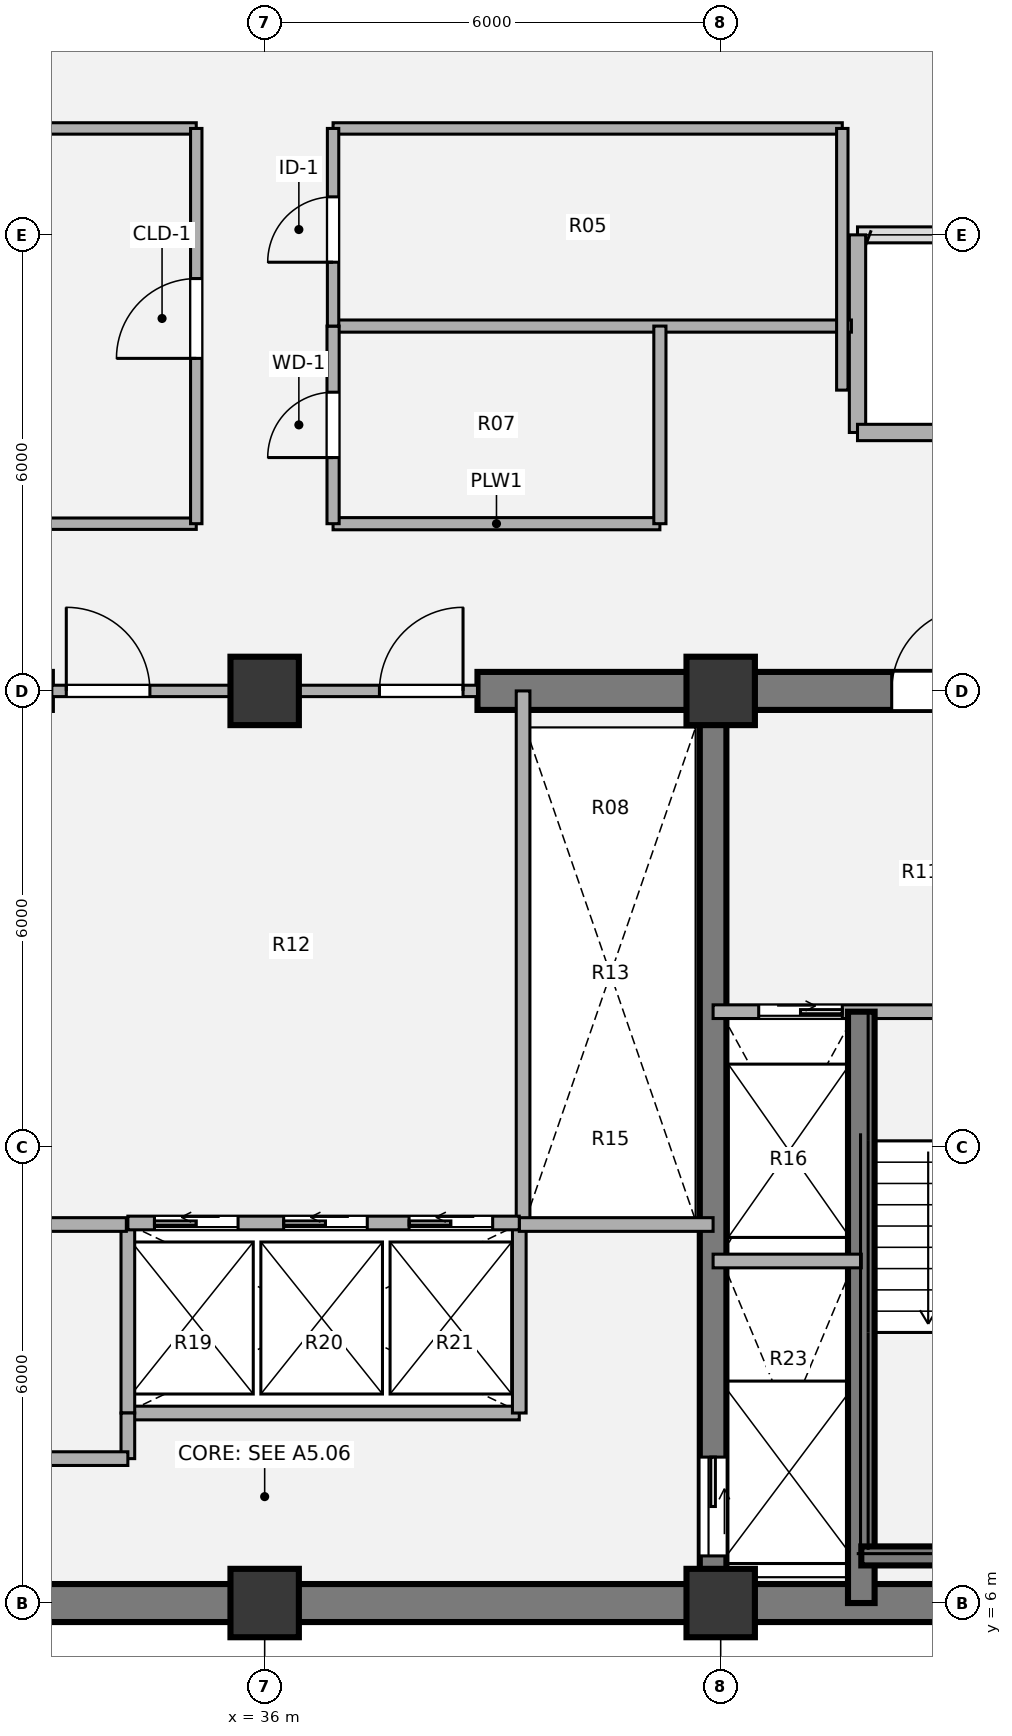
"""IFC4 building model, lengths in metres.
Left out: names, types, materials, properties, quantities, classifications, styles, units other than length and angle.
Written with IfcOpenShell. Run it as: python <this file> out.ifc"""

import sys

from ifc_helpers import new_model, si_unit, direction, frame, frame_2d, origin, origin_2d, place, context, subcontext, project, spatial, rectangle, extrude, source, transform, mapped, element, fill, save


model = new_model("IFC4")
c1 = context("Model", 3, precision=1e-05, world=origin(), true_north=direction((0.0, 1.0)))
c2 = subcontext(c1, "Body", "Model", "MODEL_VIEW")
j1 = project(units=[si_unit("LENGTHUNIT", "METRE"), si_unit("PLANEANGLEUNIT", "RADIAN")], contexts=[c1])
p1 = place(None, origin())
s1 = spatial("IfcSite", under=j1, at=p1, CompositionType="ELEMENT")
p2 = place(p1, origin())
s2 = spatial("IfcBuilding", under=s1, at=p2, CompositionType="ELEMENT")
p3 = place(p2, frame((0.0, 0.0, 123.84)))
s3 = spatial("IfcBuildingStorey", under=s2, at=p3, CompositionType="ELEMENT", Elevation=123.84)
m1 = source(origin(), c2, "Body", "SweptSolid", [
    extrude(rectangle(XDim=0.9, YDim=0.9, at=origin_2d()), origin(), (0.0, 0.0, 1.0), 3.78),
])
for number, where, z_axis, x_axis in (
    (1, (36.0, 6.0, 0.0), (0.0, 0.0, 1.0), (1.0, 0.0, 0.0)),
    (2, (42.0, 6.0, 0.0), (0.0, 0.0, 1.0), (1.0, 0.0, 0.0)),
    (3, (36.0, 18.0, 0.0), (0.0, 0.0, 1.0), (1.0, 0.0, 0.0)),
    (4, (42.0, 18.0, 0.0), (0.0, 0.0, 1.0), (1.0, 0.0, 0.0)),
):
    element("IfcColumn", number, at=place(p3, frame(where, z_axis=z_axis, x_axis=x_axis)), inside=s3, PredefinedType="COLUMN", context=c2, shape_type="MappedRepresentation", body=[
        mapped(m1, transform((0.0, 0.0, 0.0), x_axis=(1.0, 0.0, 0.0), y_axis=(0.0, 1.0, 0.0), z_axis=(0.0, 0.0, 1.0), scale=1.0)),
    ])
p4 = place(p3, frame((48.25, 6.0, 0.0), z_axis=(0.0, 0.0, 1.0), x_axis=(-1.0, 0.0, 0.0)))
e5 = element("IfcWall", 5, at=p4, inside=s3, PredefinedType="SHEAR", context=c2, shape_type="SweptSolid", body=[
    extrude(rectangle(XDim=24.5, YDim=0.5, at=frame_2d((12.25, 0.0))), origin(), (0.0, 0.0, 1.0), 3.78),
])
p5 = place(p3, frame((23.75, 18.0, 0.0), z_axis=(0.0, 0.0, 1.0), x_axis=(1.0, 0.0, 0.0)))
e6 = element("IfcWall", 6, at=p5, inside=s3, PredefinedType="SHEAR", context=c2, shape_type="SweptSolid", body=[
    extrude(rectangle(XDim=9.45, YDim=0.5, at=frame_2d((4.725, 0.0))), origin(), (0.0, 0.0, 1.0), 3.78),
])
p6 = place(p5, frame((2.95, 0.0, 0.0)))
e7 = element("IfcOpeningElement", 7, at=p6, cuts=e6, PredefinedType="OPENING", context=c2, shape_type="SweptSolid", body=[
    extrude(rectangle(XDim=1.1, YDim=2.1, at=origin_2d()), frame((0.55, 0.26, 1.05), z_axis=(0.0, -1.0, 0.0), x_axis=(1.0, 0.0, 0.0)), (0.0, 0.0, 1.0), 0.52),
])
p7 = place(p3, frame((38.8, 18.0, 0.0), z_axis=(0.0, 0.0, 1.0), x_axis=(1.0, 0.0, 0.0)))
e8 = element("IfcWall", 8, at=p7, inside=s3, PredefinedType="SHEAR", context=c2, shape_type="SweptSolid", body=[
    extrude(rectangle(XDim=9.45, YDim=0.5, at=frame_2d((4.725, 0.0))), origin(), (0.0, 0.0, 1.0), 3.78),
])
p8 = place(p7, frame((5.45, 0.0, 0.0)))
e9 = element("IfcOpeningElement", 9, at=p8, cuts=e8, PredefinedType="OPENING", context=c2, shape_type="SweptSolid", body=[
    extrude(rectangle(XDim=1.1, YDim=2.1, at=origin_2d()), frame((0.55, 0.26, 1.05), z_axis=(0.0, -1.0, 0.0), x_axis=(1.0, 0.0, 0.0)), (0.0, 0.0, 1.0), 0.52),
])
p9 = place(p3, frame((41.9, 18.0, 0.0), z_axis=(0.0, 0.0, 1.0), x_axis=(0.0, -1.0, 0.0)))
e10 = element("IfcWall", 10, at=p9, inside=s3, PredefinedType="SHEAR", context=c2, shape_type="SweptSolid", body=[
    extrude(rectangle(XDim=12.0, YDim=0.35, at=frame_2d((6.0, 0.0))), origin(), (0.0, 0.0, 1.0), 3.78),
])
p10 = place(p9, frame((10.08, 0.0, 0.0)))
e11 = element("IfcOpeningElement", 11, at=p10, cuts=e10, PredefinedType="OPENING", context=c2, shape_type="SweptSolid", body=[
    extrude(rectangle(XDim=1.3, YDim=2.1, at=origin_2d()), frame((0.65, 0.185, 1.05), z_axis=(0.0, -1.0, 0.0), x_axis=(1.0, 0.0, 0.0)), (0.0, 0.0, 1.0), 0.37),
])
p11 = place(p3, frame((43.8, 24.0, 0.0), z_axis=(0.0, 0.0, 1.0), x_axis=(0.0, -1.0, 0.0)))
e12 = element("IfcWall", 12, at=p11, inside=s3, PredefinedType="SOLIDWALL", context=c2, shape_type="SweptSolid", body=[
    extrude(rectangle(XDim=2.6, YDim=0.215, at=frame_2d((1.3, 0.0))), origin(), (0.0, 0.0, 1.0), 3.53),
])
p12 = place(p3, frame((43.8, 21.4, 0.0), z_axis=(0.0, 0.0, 1.0), x_axis=(1.0, 0.0, 0.0)))
e13 = element("IfcWall", 13, at=p12, inside=s3, PredefinedType="SOLIDWALL", context=c2, shape_type="SweptSolid", body=[
    extrude(rectangle(XDim=3.85, YDim=0.215, at=frame_2d((1.925, 0.0))), origin(), (0.0, 0.0, 1.0), 3.53),
])
p13 = place(p3, frame((34.2, 8.5, 0.0), z_axis=(0.0, 0.0, 1.0), x_axis=(1.0, 0.0, 0.0)))
e14 = element("IfcWall", 14, at=p13, inside=s3, PredefinedType="PARTITIONING", context=c2, shape_type="SweptSolid", body=[
    extrude(rectangle(XDim=5.15, YDim=0.18, at=frame_2d((2.575, 0.0))), origin(), (0.0, 0.0, 1.0), 3.5),
])
for number, where, z_axis, x_axis in (
    (15, (34.2, 8.5, 0.0), (0.0, 0.0, 1.0), (0.0, 1.0, 0.0)),
    (16, (39.35, 8.5, 0.0), (0.0, 0.0, 1.0), (0.0, 1.0, 0.0)),
):
    element("IfcWall", number, at=place(p3, frame(where, z_axis=z_axis, x_axis=x_axis)), inside=s3, PredefinedType="PARTITIONING", context=c2, shape_type="SweptSolid", body=[
        extrude(rectangle(XDim=2.5, YDim=0.18, at=frame_2d((1.25, 0.0))), origin(), (0.0, 0.0, 1.0), 3.5),
    ])
p14 = place(p3, frame((39.4, 11.0, 0.0), z_axis=(0.0, 0.0, 1.0), x_axis=(0.0, 1.0, 0.0)))
e17 = element("IfcWall", 17, at=p14, inside=s3, PredefinedType="PARTITIONING", context=c2, shape_type="SweptSolid", body=[
    extrude(rectangle(XDim=7.0, YDim=0.18, at=frame_2d((3.5, 0.0))), origin(), (0.0, 0.0, 1.0), 3.5),
])
p15 = place(p3, frame((30.1, 10.98, 0.0), z_axis=(0.0, 0.0, 1.0), x_axis=(1.0, 0.0, 0.0)))
e18 = element("IfcWall", 18, at=p15, inside=s3, PredefinedType="PARTITIONING", context=c2, shape_type="SweptSolid", body=[
    extrude(rectangle(XDim=4.08, YDim=0.18, at=frame_2d((2.04, 0.0))), origin(), (0.0, 0.0, 1.0), 3.5),
])
p16 = place(p3, frame((34.2, 7.9, 0.0), z_axis=(0.0, 0.0, 1.0), x_axis=(0.0, 1.0, 0.0)))
e19 = element("IfcWall", 19, at=p16, inside=s3, PredefinedType="PARTITIONING", context=c2, shape_type="SweptSolid", body=[
    extrude(rectangle(XDim=0.6, YDim=0.18, at=frame_2d((0.3, 0.0))), origin(), (0.0, 0.0, 1.0), 3.5),
])
p17 = place(p3, frame((32.6, 7.9, 0.0), z_axis=(0.0, 0.0, 1.0), x_axis=(1.0, 0.0, 0.0)))
e20 = element("IfcWall", 20, at=p17, inside=s3, PredefinedType="PARTITIONING", context=c2, shape_type="SweptSolid", body=[
    extrude(rectangle(XDim=1.6, YDim=0.18, at=frame_2d((0.8, 0.0))), origin(), (0.0, 0.0, 1.0), 3.5),
])
p18 = place(p3, frame((39.35, 10.98, 0.0), z_axis=(0.0, 0.0, 1.0), x_axis=(1.0, 0.0, 0.0)))
e21 = element("IfcWall", 21, at=p18, inside=s3, PredefinedType="PARTITIONING", context=c2, shape_type="SweptSolid", body=[
    extrude(rectangle(XDim=2.55, YDim=0.18, at=frame_2d((1.275, 0.0))), origin(), (0.0, 0.0, 1.0), 3.5),
])
p19 = place(p3, frame((33.2, 18.0, 0.0), z_axis=(0.0, 0.0, 1.0), x_axis=(1.0, 0.0, 0.0)))
e22 = element("IfcWall", 22, at=p19, inside=s3, PredefinedType="PARTITIONING", context=c2, shape_type="SweptSolid", body=[
    extrude(rectangle(XDim=5.6, YDim=0.15, at=frame_2d((2.8, 0.0))), origin(), (0.0, 0.0, 1.0), 2.315),
])
p20 = place(p19, frame((0.19, 0.0, 0.0)))
e23 = element("IfcOpeningElement", 23, at=p20, cuts=e22, PredefinedType="OPENING", context=c2, shape_type="SweptSolid", body=[
    extrude(rectangle(XDim=1.1, YDim=2.1, at=origin_2d()), frame((0.55, 0.085, 1.05), z_axis=(0.0, -1.0, 0.0), x_axis=(1.0, 0.0, 0.0)), (0.0, 0.0, 1.0), 0.17),
])
p21 = place(p19, frame((4.31, 0.0, 0.0)))
e24 = element("IfcOpeningElement", 24, at=p21, cuts=e22, PredefinedType="OPENING", context=c2, shape_type="SweptSolid", body=[
    extrude(rectangle(XDim=1.1, YDim=2.1, at=origin_2d()), frame((0.55, 0.085, 1.05), z_axis=(0.0, -1.0, 0.0), x_axis=(1.0, 0.0, 0.0)), (0.0, 0.0, 1.0), 0.17),
])
p22 = place(p3, frame((41.9, 13.78, 0.0), z_axis=(0.0, 0.0, 1.0), x_axis=(1.0, 0.0, 0.0)))
e25 = element("IfcWall", 25, at=p22, inside=s3, PredefinedType="PARTITIONING", context=c2, shape_type="SweptSolid", body=[
    extrude(rectangle(XDim=6.1, YDim=0.18, at=frame_2d((3.05, 0.0))), origin(), (0.0, 0.0, 1.0), 3.5),
])
p23 = place(p22, frame((0.6, 0.0, 0.0)))
e26 = element("IfcOpeningElement", 26, at=p23, cuts=e25, PredefinedType="OPENING", context=c2, shape_type="SweptSolid", body=[
    extrude(rectangle(XDim=1.1, YDim=2.1, at=origin_2d()), frame((0.55, 0.1, 1.05), z_axis=(0.0, -1.0, 0.0), x_axis=(1.0, 0.0, 0.0)), (0.0, 0.0, 1.0), 0.2),
])
p24 = place(p22, frame((3.8, 0.0, 0.0)))
e27 = element("IfcOpeningElement", 27, at=p24, cuts=e25, PredefinedType="OPENING", context=c2, shape_type="SweptSolid", body=[
    extrude(rectangle(XDim=1.1, YDim=2.1, at=origin_2d()), frame((0.55, 0.1, 1.05), z_axis=(0.0, -1.0, 0.0), x_axis=(1.0, 0.0, 0.0)), (0.0, 0.0, 1.0), 0.2),
])
p25 = place(p3, frame((43.85, 6.0, 0.0), z_axis=(0.0, 0.0, 1.0), x_axis=(0.0, 1.0, 0.0)))
e28 = element("IfcWall", 28, at=p25, inside=s3, PredefinedType="SHEAR", context=c2, shape_type="SweptSolid", body=[
    extrude(rectangle(XDim=7.78, YDim=0.35, at=frame_2d((3.89, 0.0))), origin(), (0.0, 0.0, 1.0), 3.85),
])
p26 = place(p3, frame((43.85, 6.62, 0.0), z_axis=(0.0, 0.0, 1.0), x_axis=(1.0, 0.0, 0.0)))
e29 = element("IfcWall", 29, at=p26, inside=s3, PredefinedType="SHEAR", context=c2, shape_type="SweptSolid", body=[
    extrude(rectangle(XDim=3.57, YDim=0.25, at=frame_2d((1.785, 0.0))), origin(), (0.0, 0.0, 1.0), 3.85),
])
p27 = place(p3, frame((41.9, 10.5, 0.0), z_axis=(0.0, 0.0, 1.0), x_axis=(1.0, 0.0, 0.0)))
e30 = element("IfcWall", 30, at=p27, inside=s3, PredefinedType="PARTITIONING", context=c2, shape_type="SweptSolid", body=[
    extrude(rectangle(XDim=1.95, YDim=0.18, at=frame_2d((0.975, 0.0))), origin(), (0.0, 0.0, 1.0), 3.5),
])
p28 = place(p3, frame((34.2, 11.0, 0.0), z_axis=(0.0, 0.0, 1.0), x_axis=(1.0, 0.0, 0.0)))
e31 = element("IfcWall", 31, at=p28, inside=s3, PredefinedType="PARTITIONING", context=c2, shape_type="SweptSolid", body=[
    extrude(rectangle(XDim=5.15, YDim=0.18, at=frame_2d((2.575, 0.0))), origin(), (0.0, 0.0, 1.0), 3.5),
])
p29 = place(p28, frame((0.35, 0.0, 0.0)))
e32 = element("IfcOpeningElement", 32, at=p29, cuts=e31, PredefinedType="OPENING", context=c2, shape_type="SweptSolid", body=[
    extrude(rectangle(XDim=1.1, YDim=2.1, at=origin_2d()), frame((0.55, 0.1, 1.05), z_axis=(0.0, -1.0, 0.0), x_axis=(1.0, 0.0, 0.0)), (0.0, 0.0, 1.0), 0.2),
])
p30 = place(p28, frame((2.05, 0.0, 0.0)))
e33 = element("IfcOpeningElement", 33, at=p30, cuts=e31, PredefinedType="OPENING", context=c2, shape_type="SweptSolid", body=[
    extrude(rectangle(XDim=1.1, YDim=2.1, at=origin_2d()), frame((0.55, 0.1, 1.05), z_axis=(0.0, -1.0, 0.0), x_axis=(1.0, 0.0, 0.0)), (0.0, 0.0, 1.0), 0.2),
])
p31 = place(p28, frame((3.7, 0.0, 0.0)))
e34 = element("IfcOpeningElement", 34, at=p31, cuts=e31, PredefinedType="OPENING", context=c2, shape_type="SweptSolid", body=[
    extrude(rectangle(XDim=1.1, YDim=2.1, at=origin_2d()), frame((0.55, 0.1, 1.05), z_axis=(0.0, -1.0, 0.0), x_axis=(1.0, 0.0, 0.0)), (0.0, 0.0, 1.0), 0.2),
])
p32 = place(p3, frame((28.4, 20.2, 0.0), z_axis=(0.0, 0.0, 1.0), x_axis=(1.0, 0.0, 0.0)))
e35 = element("IfcWall", 35, at=p32, inside=s3, PredefinedType="PARTITIONING", context=c2, shape_type="SweptSolid", body=[
    extrude(rectangle(XDim=6.7, YDim=0.15, at=frame_2d((3.35, 0.0))), origin(), (0.0, 0.0, 1.0), 3.5),
])
p33 = place(p3, frame((36.9, 20.2, 0.0), z_axis=(0.0, 0.0, 1.0), x_axis=(1.0, 0.0, 0.0)))
e36 = element("IfcWall", 36, at=p33, inside=s3, PredefinedType="PLUMBINGWALL", context=c2, shape_type="SweptSolid", body=[
    extrude(rectangle(XDim=4.3, YDim=0.16, at=frame_2d((2.15, 0.0))), origin(), (0.0, 0.0, 1.0), 3.5),
])
p34 = place(p3, frame((36.9, 22.8, 0.0), z_axis=(0.0, 0.0, 1.0), x_axis=(1.0, 0.0, 0.0)))
e37 = element("IfcWall", 37, at=p34, inside=s3, PredefinedType="PLUMBINGWALL", context=c2, shape_type="SweptSolid", body=[
    extrude(rectangle(XDim=6.82, YDim=0.16, at=frame_2d((3.41, 0.0))), origin(), (0.0, 0.0, 1.0), 3.5),
])
for number, where, z_axis, x_axis in (
    (38, (28.4, 25.4, 0.0), (0.0, 0.0, 1.0), (1.0, 0.0, 0.0)),
    (39, (36.9, 25.4, 0.0), (0.0, 0.0, 1.0), (1.0, 0.0, 0.0)),
):
    element("IfcWall", number, at=place(p3, frame(where, z_axis=z_axis, x_axis=x_axis)), inside=s3, PredefinedType="PARTITIONING", context=c2, shape_type="SweptSolid", body=[
        extrude(rectangle(XDim=6.7, YDim=0.15, at=frame_2d((3.35, 0.0))), origin(), (0.0, 0.0, 1.0), 3.5),
    ])
p35 = place(p3, frame((35.1, 20.2, 0.0), z_axis=(0.0, 0.0, 1.0), x_axis=(0.0, 1.0, 0.0)))
e40 = element("IfcWall", 40, at=p35, inside=s3, PredefinedType="PARTITIONING", context=c2, shape_type="SweptSolid", body=[
    extrude(rectangle(XDim=5.2, YDim=0.15, at=frame_2d((2.6, 0.0))), origin(), (0.0, 0.0, 1.0), 3.5),
])
p36 = place(p35, frame((2.175, 0.0, 0.0)))
e41 = element("IfcOpeningElement", 41, at=p36, cuts=e40, PredefinedType="OPENING", context=c2, shape_type="SweptSolid", body=[
    extrude(rectangle(XDim=1.05, YDim=2.1, at=origin_2d()), frame((0.525, 0.085, 1.05), z_axis=(0.0, -1.0, 0.0), x_axis=(1.0, 0.0, 0.0)), (0.0, 0.0, 1.0), 0.17),
])
p37 = place(p3, frame((36.9, 20.2, 0.0), z_axis=(0.0, 0.0, 1.0), x_axis=(0.0, 1.0, 0.0)))
e42 = element("IfcWall", 42, at=p37, inside=s3, PredefinedType="PLUMBINGWALL", context=c2, shape_type="SweptSolid", body=[
    extrude(rectangle(XDim=2.6, YDim=0.16, at=frame_2d((1.3, 0.0))), origin(), (0.0, 0.0, 1.0), 3.5),
])
p38 = place(p37, frame((0.87, 0.0, 0.0)))
e43 = element("IfcOpeningElement", 43, at=p38, cuts=e42, PredefinedType="OPENING", context=c2, shape_type="SweptSolid", body=[
    extrude(rectangle(XDim=0.86, YDim=2.1, at=origin_2d()), frame((0.43, 0.09, 1.05), z_axis=(0.0, -1.0, 0.0), x_axis=(1.0, 0.0, 0.0)), (0.0, 0.0, 1.0), 0.18),
])
p39 = place(p3, frame((36.9, 22.8, 0.0), z_axis=(0.0, 0.0, 1.0), x_axis=(0.0, 1.0, 0.0)))
e44 = element("IfcWall", 44, at=p39, inside=s3, PredefinedType="PARTITIONING", context=c2, shape_type="SweptSolid", body=[
    extrude(rectangle(XDim=2.6, YDim=0.15, at=frame_2d((1.3, 0.0))), origin(), (0.0, 0.0, 1.0), 3.5),
])
p40 = place(p39, frame((0.84, 0.0, 0.0)))
e45 = element("IfcOpeningElement", 45, at=p40, cuts=e44, PredefinedType="OPENING", context=c2, shape_type="SweptSolid", body=[
    extrude(rectangle(XDim=0.86, YDim=2.1, at=origin_2d()), frame((0.43, 0.085, 1.05), z_axis=(0.0, -1.0, 0.0), x_axis=(1.0, 0.0, 0.0)), (0.0, 0.0, 1.0), 0.17),
])
p41 = place(p3, frame((41.2, 20.2, 0.0), z_axis=(0.0, 0.0, 1.0), x_axis=(0.0, 1.0, 0.0)))
e46 = element("IfcWall", 46, at=p41, inside=s3, PredefinedType="PLUMBINGWALL", context=c2, shape_type="SweptSolid", body=[
    extrude(rectangle(XDim=2.6, YDim=0.16, at=frame_2d((1.3, 0.0))), origin(), (0.0, 0.0, 1.0), 2.815),
])
p42 = place(p3, frame((43.6, 21.958, 0.0), z_axis=(0.0, 0.0, 1.0), x_axis=(0.0, 1.0, 0.0)))
e47 = element("IfcWall", 47, at=p42, inside=s3, PredefinedType="PARTITIONING", context=c2, shape_type="SweptSolid", body=[
    extrude(rectangle(XDim=3.442, YDim=0.15, at=frame_2d((1.721, 0.0))), origin(), (0.0, 0.0, 1.0), 3.5),
])
m2 = source(origin(), c2, "Body", "SweptSolid", [
    extrude(rectangle(XDim=1.1, YDim=2.1, at=origin_2d()), frame((0.55, 0.025, 1.05), z_axis=(0.0, -1.0, 0.0), x_axis=(1.0, 0.0, 0.0)), (0.0, 0.0, 1.0), 0.05),
])
p43 = place(p20, origin())
e48 = element("IfcDoor", 48, at=p43, inside=s3, OperationType="SINGLE_SWING_LEFT", PredefinedType="DOOR", context=c2, shape_type="MappedRepresentation", body=[
    mapped(m2, transform((0.0, 0.0, 0.0), x_axis=(1.0, 0.0, 0.0), y_axis=(0.0, 1.0, 0.0), z_axis=(0.0, 0.0, 1.0), scale=1.0)),
])
fill(e23, e48)
p44 = place(p21, origin())
e49 = element("IfcDoor", 49, at=p44, inside=s3, OperationType="SINGLE_SWING_RIGHT", PredefinedType="DOOR", context=c2, shape_type="MappedRepresentation", body=[
    mapped(m2, transform((0.0, 0.0, 0.0), x_axis=(1.0, 0.0, 0.0), y_axis=(0.0, 1.0, 0.0), z_axis=(0.0, 0.0, 1.0), scale=1.0)),
])
fill(e24, e49)
m3 = source(origin(), c2, "Body", "SweptSolid", [
    extrude(rectangle(XDim=1.1, YDim=2.1, at=origin_2d()), frame((0.55, 0.025, 1.05), z_axis=(0.0, -1.0, 0.0), x_axis=(1.0, 0.0, 0.0)), (0.0, 0.0, 1.0), 0.05),
])
p45 = place(p23, origin())
e50 = element("IfcDoor", 50, at=p45, inside=s3, OperationType="SLIDING_TO_RIGHT", PredefinedType="DOOR", context=c2, shape_type="MappedRepresentation", body=[
    mapped(m3, transform((0.0, 0.0, 0.0), x_axis=(1.0, 0.0, 0.0), y_axis=(0.0, 1.0, 0.0), z_axis=(0.0, 0.0, 1.0), scale=1.0)),
])
fill(e26, e50)
m4 = source(origin(), c2, "Body", "SweptSolid", [
    extrude(rectangle(XDim=1.3, YDim=2.1, at=origin_2d()), frame((0.65, 0.025, 1.05), z_axis=(0.0, -1.0, 0.0), x_axis=(1.0, 0.0, 0.0)), (0.0, 0.0, 1.0), 0.05),
])
p46 = place(p10, origin())
e51 = element("IfcDoor", 51, at=p46, inside=s3, OperationType="SLIDING_TO_LEFT", PredefinedType="DOOR", context=c2, shape_type="MappedRepresentation", body=[
    mapped(m4, transform((0.0, 0.0, 0.0), x_axis=(1.0, 0.0, 0.0), y_axis=(0.0, 1.0, 0.0), z_axis=(0.0, 0.0, 1.0), scale=1.0)),
])
fill(e11, e51)
p47 = place(p8, origin())
e52 = element("IfcDoor", 52, at=p47, inside=s3, OperationType="SINGLE_SWING_RIGHT", PredefinedType="DOOR", context=c2, shape_type="MappedRepresentation", body=[
    mapped(m2, transform((0.0, 0.0, 0.0), x_axis=(1.0, 0.0, 0.0), y_axis=(0.0, 1.0, 0.0), z_axis=(0.0, 0.0, 1.0), scale=1.0)),
])
fill(e9, e52)
p48 = place(p29, origin())
e53 = element("IfcDoor", 53, at=p48, inside=s3, OperationType="SLIDING_TO_LEFT", PredefinedType="DOOR", context=c2, shape_type="MappedRepresentation", body=[
    mapped(m3, transform((0.0, 0.0, 0.0), x_axis=(1.0, 0.0, 0.0), y_axis=(0.0, 1.0, 0.0), z_axis=(0.0, 0.0, 1.0), scale=1.0)),
])
fill(e32, e53)
p49 = place(p30, origin())
e54 = element("IfcDoor", 54, at=p49, inside=s3, OperationType="SLIDING_TO_LEFT", PredefinedType="DOOR", context=c2, shape_type="MappedRepresentation", body=[
    mapped(m3, transform((0.0, 0.0, 0.0), x_axis=(1.0, 0.0, 0.0), y_axis=(0.0, 1.0, 0.0), z_axis=(0.0, 0.0, 1.0), scale=1.0)),
])
fill(e33, e54)
p50 = place(p31, origin())
e55 = element("IfcDoor", 55, at=p50, inside=s3, OperationType="SLIDING_TO_LEFT", PredefinedType="DOOR", context=c2, shape_type="MappedRepresentation", body=[
    mapped(m3, transform((0.0, 0.0, 0.0), x_axis=(1.0, 0.0, 0.0), y_axis=(0.0, 1.0, 0.0), z_axis=(0.0, 0.0, 1.0), scale=1.0)),
])
fill(e34, e55)
m5 = source(origin(), c2, "Body", "SweptSolid", [
    extrude(rectangle(XDim=1.05, YDim=2.1, at=origin_2d()), frame((0.525, 0.025, 1.05), z_axis=(0.0, -1.0, 0.0), x_axis=(1.0, 0.0, 0.0)), (0.0, 0.0, 1.0), 0.05),
])
p51 = place(p36, origin())
e56 = element("IfcDoor", 56, at=p51, inside=s3, OperationType="SINGLE_SWING_LEFT", PredefinedType="DOOR", context=c2, shape_type="MappedRepresentation", body=[
    mapped(m5, transform((0.0, 0.0, 0.0), x_axis=(1.0, 0.0, 0.0), y_axis=(0.0, 1.0, 0.0), z_axis=(0.0, 0.0, 1.0), scale=1.0)),
])
fill(e41, e56)
m6 = source(origin(), c2, "Body", "SweptSolid", [
    extrude(rectangle(XDim=0.86, YDim=2.1, at=origin_2d()), frame((0.43, 0.025, 1.05), z_axis=(0.0, -1.0, 0.0), x_axis=(1.0, 0.0, 0.0)), (0.0, 0.0, 1.0), 0.05),
])
p52 = place(p38, origin())
e57 = element("IfcDoor", 57, at=p52, inside=s3, OperationType="SINGLE_SWING_LEFT", PredefinedType="DOOR", context=c2, shape_type="MappedRepresentation", body=[
    mapped(m6, transform((0.0, 0.0, 0.0), x_axis=(1.0, 0.0, 0.0), y_axis=(0.0, 1.0, 0.0), z_axis=(0.0, 0.0, 1.0), scale=1.0)),
])
fill(e43, e57)
m7 = source(origin(), c2, "Body", "SweptSolid", [
    extrude(rectangle(XDim=0.86, YDim=2.1, at=origin_2d()), frame((0.43, 0.025, 1.05), z_axis=(0.0, -1.0, 0.0), x_axis=(1.0, 0.0, 0.0)), (0.0, 0.0, 1.0), 0.05),
])
p53 = place(p40, origin())
e58 = element("IfcDoor", 58, at=p53, inside=s3, OperationType="SINGLE_SWING_LEFT", PredefinedType="DOOR", context=c2, shape_type="MappedRepresentation", body=[
    mapped(m7, transform((0.0, 0.0, 0.0), x_axis=(1.0, 0.0, 0.0), y_axis=(0.0, 1.0, 0.0), z_axis=(0.0, 0.0, 1.0), scale=1.0)),
])
fill(e45, e58)
save(model, sys.argv[1])
